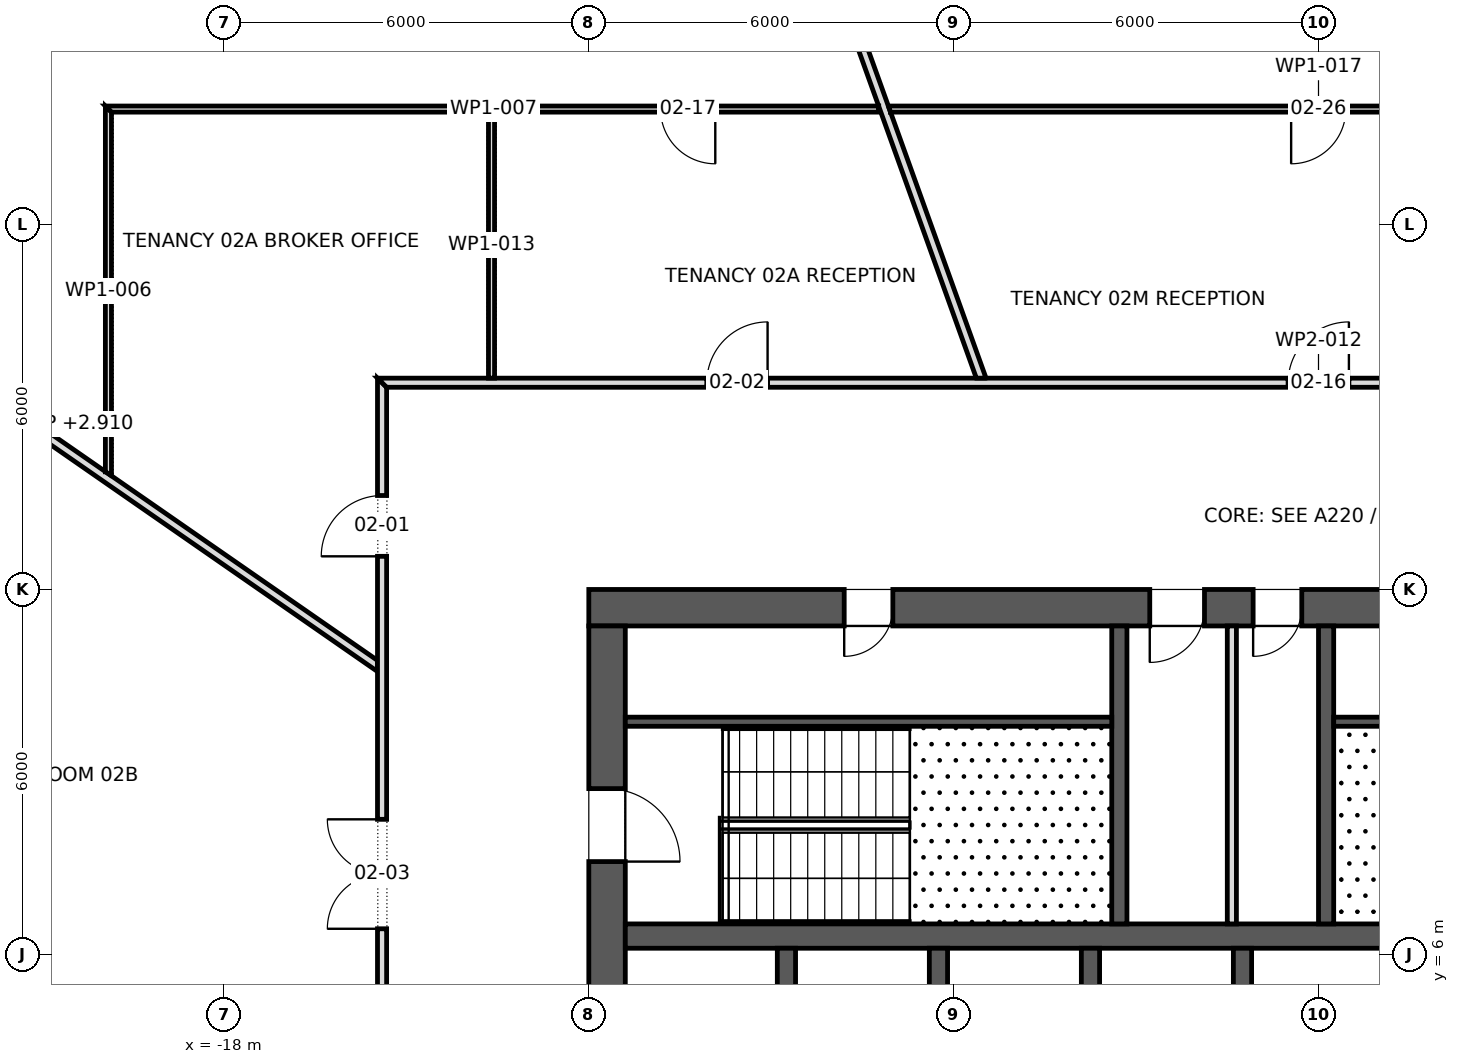
"""IFC4 building model, lengths in metres.
Left out: names, types, materials, properties, quantities, classifications, styles, units other than length and angle.
Written with IfcOpenShell. Run it as: python <this file> out.ifc"""

import sys

from ifc_helpers import new_model, si_unit, direction, frame, frame_2d, origin, place, context, subcontext, project, spatial, polyline, rectangle, outline, extrude, element, fill, save


model = new_model("IFC4")
c1 = context("Model", 3, precision=1e-05, world=origin(), true_north=direction((0.0, 1.0)))
c2 = subcontext(c1, "Body", "Model", "MODEL_VIEW")
j1 = project(units=[si_unit("LENGTHUNIT", "METRE"), si_unit("PLANEANGLEUNIT", "RADIAN")], contexts=[c1])
p1 = place(None, origin())
s1 = spatial("IfcSite", under=j1, at=p1, CompositionType="ELEMENT")
p2 = place(p1, origin())
s2 = spatial("IfcBuilding", under=s1, at=p2, CompositionType="ELEMENT")
p3 = place(p2, frame((0.0, 0.0, 44.5)))
s3 = spatial("IfcBuildingStorey", under=s2, at=p3, CompositionType="ELEMENT", Elevation=44.5)
p4 = place(p3, frame((-12.0, 11.7, 0.0), z_axis=(0.0, 0.0, 1.0), x_axis=(1.0, 0.0, 0.0)))
e1 = element("IfcWall", 1, at=p4, inside=s3, PredefinedType="SHEAR", context=c2, shape_type="SweptSolid", body=[
    extrude(rectangle(XDim=24.0, YDim=0.6, at=frame_2d((12.0, 0.0))), origin(), (0.0, 0.0, 1.0), 4.2),
])
p5 = place(p4, frame((9.225, 0.0, 0.0)))
e2 = element("IfcOpeningElement", 2, at=p5, cuts=e1, PredefinedType="OPENING", context=c2, shape_type="SweptSolid", body=[
    extrude(rectangle(XDim=0.9, YDim=2.1, at=frame_2d((0.45, 1.05))), frame((0.0, 0.312, 0.0), z_axis=(0.0, -1.0, 0.0), x_axis=(1.0, 0.0, 0.0)), (0.0, 0.0, 1.0), 0.624),
])
p6 = place(p4, frame((10.925, 0.0, 0.0)))
e3 = element("IfcOpeningElement", 3, at=p6, cuts=e1, PredefinedType="OPENING", context=c2, shape_type="SweptSolid", body=[
    extrude(rectangle(XDim=0.8, YDim=2.1, at=frame_2d((0.4, 1.05))), frame((0.0, 0.312, 0.0), z_axis=(0.0, -1.0, 0.0), x_axis=(1.0, 0.0, 0.0)), (0.0, 0.0, 1.0), 0.624),
])
p7 = place(p4, frame((4.2, 0.0, 0.0)))
e4 = element("IfcOpeningElement", 4, at=p7, cuts=e1, PredefinedType="OPENING", context=c2, shape_type="SweptSolid", body=[
    extrude(rectangle(XDim=0.8, YDim=2.1, at=frame_2d((0.4, 1.05))), frame((0.0, 0.312, 0.0), z_axis=(0.0, -1.0, 0.0), x_axis=(1.0, 0.0, 0.0)), (0.0, 0.0, 1.0), 0.624),
])
p8 = place(p4, frame((13.8, 0.0, 0.0)))
e5 = element("IfcOpeningElement", 5, at=p8, cuts=e1, PredefinedType="OPENING", context=c2, shape_type="SweptSolid", body=[
    extrude(rectangle(XDim=0.8, YDim=2.1, at=frame_2d((0.4, 1.05))), frame((0.0, 0.312, 0.0), z_axis=(0.0, -1.0, 0.0), x_axis=(1.0, 0.0, 0.0)), (0.0, 0.0, 1.0), 0.624),
])
p9 = place(p4, frame((16.6, 0.0, 0.0)))
e6 = element("IfcOpeningElement", 6, at=p9, cuts=e1, PredefinedType="OPENING", context=c2, shape_type="SweptSolid", body=[
    extrude(rectangle(XDim=0.8, YDim=2.1, at=frame_2d((0.4, 1.05))), frame((0.0, 0.312, 0.0), z_axis=(0.0, -1.0, 0.0), x_axis=(1.0, 0.0, 0.0)), (0.0, 0.0, 1.0), 0.624),
])
p10 = place(p3, frame((-11.7, -11.4, 0.0), z_axis=(0.0, 0.0, 1.0), x_axis=(0.0, 1.0, 0.0)))
e7 = element("IfcWall", 7, at=p10, inside=s3, PredefinedType="SHEAR", context=c2, shape_type="SweptSolid", body=[
    extrude(rectangle(XDim=22.8, YDim=0.6, at=frame_2d((11.4, 0.0))), origin(), (0.0, 0.0, 1.0), 4.2),
])
p11 = place(p10, frame((10.2, 0.0, 0.0)))
e8 = element("IfcOpeningElement", 8, at=p11, cuts=e7, PredefinedType="OPENING", context=c2, shape_type="SweptSolid", body=[
    extrude(rectangle(XDim=2.4, YDim=2.1, at=frame_2d((1.2, 1.05))), frame((0.0, 0.312, 0.0), z_axis=(0.0, -1.0, 0.0), x_axis=(1.0, 0.0, 0.0)), (0.0, 0.0, 1.0), 0.624),
])
p12 = place(p10, frame((18.925, 0.0, 0.0)))
e9 = element("IfcOpeningElement", 9, at=p12, cuts=e7, PredefinedType="OPENING", context=c2, shape_type="SweptSolid", body=[
    extrude(rectangle(XDim=1.2, YDim=2.1, at=frame_2d((0.6, 1.05))), frame((0.0, 0.312, 0.0), z_axis=(0.0, -1.0, 0.0), x_axis=(1.0, 0.0, 0.0)), (0.0, 0.0, 1.0), 0.624),
])
p13 = place(p10, frame((2.675, 0.0, 0.0)))
e10 = element("IfcOpeningElement", 10, at=p13, cuts=e7, PredefinedType="OPENING", context=c2, shape_type="SweptSolid", body=[
    extrude(rectangle(XDim=1.2, YDim=2.1, at=frame_2d((0.6, 1.05))), frame((0.0, 0.312, 0.0), z_axis=(0.0, -1.0, 0.0), x_axis=(1.0, 0.0, 0.0)), (0.0, 0.0, 1.0), 0.624),
])
p14 = place(p3, frame((-11.4, 6.3, 0.0), z_axis=(0.0, 0.0, 1.0), x_axis=(1.0, 0.0, 0.0)))
e11 = element("IfcWall", 11, at=p14, inside=s3, PredefinedType="SHEAR", context=c2, shape_type="SweptSolid", body=[
    extrude(rectangle(XDim=22.8, YDim=0.4, at=frame_2d((11.4, 0.0))), origin(), (0.0, 0.0, 1.0), 4.2),
])
p15 = place(p14, frame((20.85, 0.0, 0.0)))
e12 = element("IfcOpeningElement", 12, at=p15, cuts=e11, PredefinedType="OPENING", context=c2, shape_type="SweptSolid", body=[
    extrude(rectangle(XDim=1.1, YDim=2.1, at=frame_2d((0.55, 1.05))), frame((0.0, 0.212, 0.0), z_axis=(0.0, -1.0, 0.0), x_axis=(1.0, 0.0, 0.0)), (0.0, 0.0, 1.0), 0.424),
])
for number, where, z_axis, x_axis in (
    (13, (-8.75, 3.2, 0.0), (0.0, 0.0, 1.0), (0.0, 1.0, 0.0)),
    (14, (-6.25, 3.2, 0.0), (0.0, 0.0, 1.0), (0.0, 1.0, 0.0)),
    (15, (-3.75, 3.2, 0.0), (0.0, 0.0, 1.0), (0.0, 1.0, 0.0)),
    (16, (-1.25, 3.2, 0.0), (0.0, 0.0, 1.0), (0.0, 1.0, 0.0)),
):
    element("IfcWall", number, at=place(p3, frame(where, z_axis=z_axis, x_axis=x_axis)), inside=s3, PredefinedType="SHEAR", context=c2, shape_type="SweptSolid", body=[
        extrude(rectangle(XDim=2.9, YDim=0.3, at=frame_2d((1.45, 0.0))), origin(), (0.0, 0.0, 1.0), 4.2),
    ])
for number, where, z_axis, x_axis in (
    (17, (-3.275, 6.5, 0.0), (0.0, 0.0, 1.0), (0.0, 1.0, 0.0)),
    (18, (0.125, 6.5, 0.0), (0.0, 0.0, 1.0), (0.0, 1.0, 0.0)),
):
    element("IfcWall", number, at=place(p3, frame(where, z_axis=z_axis, x_axis=x_axis)), inside=s3, PredefinedType="SHEAR", context=c2, shape_type="SweptSolid", body=[
        extrude(rectangle(XDim=4.9, YDim=0.25, at=frame_2d((2.45, 0.0))), origin(), (0.0, 0.0, 1.0), 3.9),
    ])
for number, where, z_axis, x_axis in (
    (19, (-11.4, 9.825, 0.0), (0.0, 0.0, 1.0), (1.0, 0.0, 0.0)),
    (20, (0.25, 9.825, 0.0), (0.0, 0.0, 1.0), (1.0, 0.0, 0.0)),
):
    element("IfcWall", number, at=place(p3, frame(where, z_axis=z_axis, x_axis=x_axis)), inside=s3, PredefinedType="SHEAR", context=c2, shape_type="SweptSolid", body=[
        extrude(rectangle(XDim=8.0, YDim=0.15, at=frame_2d((4.0, 0.0))), origin(), (0.0, 0.0, 1.0), 3.9),
    ])
p16 = place(p3, frame((-1.425, 6.5, 0.0), z_axis=(0.0, 0.0, 1.0), x_axis=(0.0, 1.0, 0.0)))
e21 = element("IfcWall", 21, at=p16, inside=s3, PredefinedType="PARTITIONING", context=c2, shape_type="SweptSolid", body=[
    extrude(rectangle(XDim=4.9, YDim=0.15, at=frame_2d((2.45, 0.0))), origin(), (0.0, 0.0, 1.0), 3.9),
])
p17 = place(p3, frame((-26.949, 18.703, 0.0), z_axis=(0.0, 0.0, 1.0), x_axis=(0.821614916445, -0.570042918626, 0.0)))
e22 = element("IfcWall", 22, at=p17, inside=s3, PredefinedType="PARTITIONING", context=c2, shape_type="SweptSolid", body=[
    extrude(outline(polyline([(14.017, -0.075), (14.017, -0.074), (13.967, -0.002), (13.967, -0.002), (13.914, 0.075), (12.1, 0.075), (10.286, 0.075), (8.472, 0.075), (8.469, 0.073), (8.467, 0.075), (6.779, 0.075), (5.09, 0.075), (3.402, 0.075), (1.713, 0.075), (0.024, 0.075), (0.004, 0.0), (0.0, -0.071), (0.0, -0.075), (1.752, -0.075), (3.504, -0.075), (5.257, -0.075), (7.009, -0.075), (8.761, -0.075), (10.513, -0.075), (12.265, -0.075), (14.017, -0.075)])), origin(), (0.0, 0.0, 1.0), 2.91),
])
p18 = place(p3, frame((-19.9, 13.869, 0.0), z_axis=(0.0, 0.0, 1.0), x_axis=(0.0, 1.0, 0.0)))
e23 = element("IfcWall", 23, at=p18, inside=s3, PredefinedType="PARTITIONING", context=c2, shape_type="SweptSolid", body=[
    extrude(outline(polyline([(0.0, -0.05), (1.994, -0.05), (3.987, -0.05), (5.981, -0.05), (5.981, -0.05), (6.081, 0.05), (4.578, 0.05), (3.075, 0.05), (1.572, 0.05), (0.069, 0.05), (0.0, -0.05), (0.0, -0.05)])), origin(), (0.0, 0.0, 1.0), 3.9),
])
p19 = place(p3, frame((-19.95, 19.9, 0.0), z_axis=(0.0, 0.0, 1.0), x_axis=(1.0, 0.0, 0.0)))
e24 = element("IfcWall", 24, at=p19, inside=s3, PredefinedType="PARTITIONING", context=c2, shape_type="SweptSolid", body=[
    extrude(outline(polyline([(12.718, 0.05), (10.901, 0.05), (9.084, 0.05), (7.267, 0.05), (5.45, 0.05), (3.634, 0.05), (1.817, 0.05), (0.0, 0.05), (0.1, -0.05), (1.903, -0.05), (3.705, -0.05), (5.508, -0.05), (7.31, -0.05), (9.113, -0.05), (10.915, -0.05), (12.718, -0.05), (12.718, 0.05)])), origin(), (0.0, 0.0, 1.0), 3.9),
])
p20 = place(p19, frame((9.13, 0.0, 0.0)))
e25 = element("IfcOpeningElement", 25, at=p20, cuts=e24, PredefinedType="OPENING", context=c2, shape_type="SweptSolid", body=[
    extrude(rectangle(XDim=0.9, YDim=2.1, at=frame_2d((0.45, 1.05))), frame((0.0, 0.062, 0.0), z_axis=(0.0, -1.0, 0.0), x_axis=(1.0, 0.0, 0.0)), (0.0, 0.0, 1.0), 0.124),
])
p21 = place(p3, frame((-15.4, -15.475, 0.0), z_axis=(0.0, 0.0, 1.0), x_axis=(0.0, 1.0, 0.0)))
e26 = element("IfcWall", 26, at=p21, inside=s3, PredefinedType="PARTITIONING", context=c2, shape_type="SweptSolid", body=[
    extrude(outline(polyline([(0.15, -0.075), (2.066, -0.075), (3.981, -0.075), (5.897, -0.075), (7.812, -0.075), (9.728, -0.075), (11.644, -0.075), (13.56, -0.075), (15.475, -0.075), (17.391, -0.075), (19.306, -0.075), (21.222, -0.075), (23.138, -0.075), (25.053, -0.075), (26.969, -0.075), (28.885, -0.075), (30.8, -0.075), (30.95, 0.075), (29.016, 0.075), (27.081, 0.075), (25.147, 0.075), (23.212, 0.075), (21.278, 0.075), (19.344, 0.075), (17.409, 0.075), (15.475, 0.075), (13.541, 0.075), (11.606, 0.075), (9.672, 0.075), (7.738, 0.075), (5.803, 0.075), (3.869, 0.075), (1.935, 0.075), (0.0, 0.075), (0.15, -0.075)])), origin(), (0.0, 0.0, 1.0), 3.9),
])
p22 = place(p21, frame((28.02, 0.0, 0.0)))
e27 = element("IfcOpeningElement", 27, at=p22, cuts=e26, PredefinedType="OPENING", context=c2, shape_type="SweptSolid", body=[
    extrude(rectangle(XDim=1.0, YDim=2.1, at=frame_2d((0.5, 1.05))), frame((0.0, 0.087, 0.0), z_axis=(0.0, -1.0, 0.0), x_axis=(1.0, 0.0, 0.0)), (0.0, 0.0, 1.0), 0.174),
])
p23 = place(p21, frame((21.895, 0.0, 0.0)))
e28 = element("IfcOpeningElement", 28, at=p23, cuts=e26, PredefinedType="OPENING", context=c2, shape_type="SweptSolid", body=[
    extrude(rectangle(XDim=1.8, YDim=2.1, at=frame_2d((0.9, 1.05))), frame((0.0, 0.087, 0.0), z_axis=(0.0, -1.0, 0.0), x_axis=(1.0, 0.0, 0.0)), (0.0, 0.0, 1.0), 0.174),
])
p24 = place(p21, frame((15.798, 0.0, 0.0)))
e29 = element("IfcOpeningElement", 29, at=p24, cuts=e26, PredefinedType="OPENING", context=c2, shape_type="SweptSolid", body=[
    extrude(rectangle(XDim=1.8, YDim=2.1, at=frame_2d((0.9, 1.05))), frame((0.0, 0.087, 0.0), z_axis=(0.0, -1.0, 0.0), x_axis=(1.0, 0.0, 0.0)), (0.0, 0.0, 1.0), 0.174),
])
p25 = place(p21, frame((10.343, 0.0, 0.0)))
e30 = element("IfcOpeningElement", 30, at=p25, cuts=e26, PredefinedType="OPENING", context=c2, shape_type="SweptSolid", body=[
    extrude(rectangle(XDim=1.8, YDim=2.1, at=frame_2d((0.9, 1.05))), frame((0.0, 0.087, 0.0), z_axis=(0.0, -1.0, 0.0), x_axis=(1.0, 0.0, 0.0)), (0.0, 0.0, 1.0), 0.174),
])
p26 = place(p21, frame((3.795, 0.0, 0.0)))
e31 = element("IfcOpeningElement", 31, at=p26, cuts=e26, PredefinedType="OPENING", context=c2, shape_type="SweptSolid", body=[
    extrude(rectangle(XDim=1.0, YDim=2.1, at=frame_2d((0.5, 1.05))), frame((0.0, 0.087, 0.0), z_axis=(0.0, -1.0, 0.0), x_axis=(1.0, 0.0, 0.0)), (0.0, 0.0, 1.0), 0.174),
])
p27 = place(p3, frame((-15.457, 3.965, 0.0), z_axis=(0.0, 0.0, 1.0), x_axis=(-0.968658160146, 0.248397602209, 0.0)))
e32 = element("IfcWall", 32, at=p27, inside=s3, PredefinedType="PARTITIONING", context=c2, shape_type="SweptSolid", body=[
    extrude(outline(polyline([(0.038, -0.075), (1.881, -0.075), (3.723, -0.075), (5.566, -0.075), (7.409, -0.075), (9.251, -0.075), (11.094, -0.075), (12.937, -0.075), (14.779, -0.075), (16.622, -0.075), (18.465, -0.075), (18.478, -0.012), (18.478, 0.075), (16.63, 0.075), (14.782, 0.075), (12.935, 0.075), (11.087, 0.075), (9.239, 0.075), (7.391, 0.075), (5.543, 0.075), (3.696, 0.075), (1.848, 0.075), (0.0, 0.075), (0.0, 0.073), (0.038, -0.075)])), origin(), (0.0, 0.0, 1.0), 2.9),
])
p28 = place(p3, frame((-15.475, 15.4, 0.0), z_axis=(0.0, 0.0, 1.0), x_axis=(1.0, 0.0, 0.0)))
e33 = element("IfcWall", 33, at=p28, inside=s3, PredefinedType="PARTITIONING", context=c2, shape_type="SweptSolid", body=[
    extrude(outline(polyline([(0.15, -0.075), (2.066, -0.075), (3.981, -0.075), (5.897, -0.075), (7.812, -0.075), (9.728, -0.075), (11.644, -0.075), (13.56, -0.075), (15.475, -0.075), (17.391, -0.075), (19.306, -0.075), (21.222, -0.075), (23.138, -0.075), (25.053, -0.075), (26.969, -0.075), (28.885, -0.075), (30.8, -0.075), (30.95, 0.075), (29.016, 0.075), (27.081, 0.075), (25.147, 0.075), (23.212, 0.075), (21.278, 0.075), (19.344, 0.075), (17.409, 0.075), (15.475, 0.075), (13.541, 0.075), (11.606, 0.075), (9.672, 0.075), (7.738, 0.075), (5.803, 0.075), (3.869, 0.075), (1.935, 0.075), (0.0, 0.075), (0.15, -0.075)])), origin(), (0.0, 0.0, 1.0), 3.9),
])
p29 = place(p28, frame((5.415, 0.0, 0.0)))
e34 = element("IfcOpeningElement", 34, at=p29, cuts=e33, PredefinedType="OPENING", context=c2, shape_type="SweptSolid", body=[
    extrude(rectangle(XDim=1.0, YDim=2.1, at=frame_2d((0.5, 1.05))), frame((0.0, 0.087, 0.0), z_axis=(0.0, -1.0, 0.0), x_axis=(1.0, 0.0, 0.0)), (0.0, 0.0, 1.0), 0.174),
])
p30 = place(p28, frame((25.435, 0.0, 0.0)))
e35 = element("IfcOpeningElement", 35, at=p30, cuts=e33, PredefinedType="OPENING", context=c2, shape_type="SweptSolid", body=[
    extrude(rectangle(XDim=1.0, YDim=2.1, at=frame_2d((0.5, 1.05))), frame((0.0, 0.087, 0.0), z_axis=(0.0, -1.0, 0.0), x_axis=(1.0, 0.0, 0.0)), (0.0, 0.0, 1.0), 0.174),
])
p31 = place(p28, frame((14.975, 0.0, 0.0)))
e36 = element("IfcOpeningElement", 36, at=p31, cuts=e33, PredefinedType="OPENING", context=c2, shape_type="SweptSolid", body=[
    extrude(rectangle(XDim=1.0, YDim=2.1, at=frame_2d((0.5, 1.05))), frame((0.0, 0.087, 0.0), z_axis=(0.0, -1.0, 0.0), x_axis=(1.0, 0.0, 0.0)), (0.0, 0.0, 1.0), 0.174),
])
p32 = place(p3, frame((-13.6, 19.85, 0.0), z_axis=(0.0, 0.0, 1.0), x_axis=(0.0, -1.0, 0.0)))
e37 = element("IfcWall", 37, at=p32, inside=s3, PredefinedType="PARTITIONING", context=c2, shape_type="SweptSolid", body=[
    extrude(rectangle(XDim=4.375, YDim=0.1, at=frame_2d((2.188, 0.0))), origin(), (0.0, 0.0, 1.0), 3.9),
])
p33 = place(p3, frame((-10.119, 28.209, 0.0), z_axis=(0.0, 0.0, 1.0), x_axis=(0.337949016046, -0.941164418448, 0.0)))
e38 = element("IfcWall", 38, at=p33, inside=s3, PredefinedType="PARTITIONING", context=c2, shape_type="SweptSolid", body=[
    extrude(outline(polyline([(0.0, -0.075), (1.75, -0.075), (3.5, -0.075), (5.249, -0.075), (6.999, -0.075), (8.749, -0.075), (8.749, -0.074), (8.751, -0.075), (10.335, -0.075), (11.919, -0.075), (13.503, -0.075), (13.555, 0.069), (13.555, 0.069), (13.557, 0.074), (13.557, 0.075), (12.008, 0.075), (10.458, 0.075), (8.909, 0.075), (8.908, 0.073), (8.903, 0.075), (7.125, 0.075), (5.347, 0.075), (3.57, 0.075), (1.792, 0.075), (0.014, 0.075), (0.0, 0.0), (0.0, -0.071), (0.0, -0.075)])), origin(), (0.0, 0.0, 1.0), 2.91),
])
p34 = place(p3, frame((-7.074, 19.9, 0.0), z_axis=(0.0, 0.0, 1.0), x_axis=(1.0, 0.0, 0.0)))
e39 = element("IfcWall", 39, at=p34, inside=s3, PredefinedType="PARTITIONING", context=c2, shape_type="SweptSolid", body=[
    extrude(outline(polyline([(0.036, -0.05), (1.795, -0.05), (3.555, -0.05), (5.314, -0.05), (7.074, -0.05), (8.833, -0.05), (10.593, -0.05), (12.353, -0.05), (14.112, -0.05), (14.148, 0.05), (14.148, 0.05), (12.379, 0.05), (10.611, 0.05), (8.843, 0.05), (7.074, 0.05), (5.305, 0.05), (3.537, 0.05), (1.769, 0.05), (0.0, 0.05), (0.0, 0.05), (0.036, -0.05)])), origin(), (0.0, 0.0, 1.0), 3.9),
])
p35 = place(p34, frame((6.624, 0.0, 0.0)))
e40 = element("IfcOpeningElement", 40, at=p35, cuts=e39, PredefinedType="OPENING", context=c2, shape_type="SweptSolid", body=[
    extrude(rectangle(XDim=0.9, YDim=2.1, at=frame_2d((0.45, 1.05))), frame((0.0, 0.062, 0.0), z_axis=(0.0, -1.0, 0.0), x_axis=(1.0, 0.0, 0.0)), (0.0, 0.0, 1.0), 0.124),
])
p36 = place(p12, frame((1.2, 0.0, 0.0), z_axis=(0.0, 0.0, 1.0), x_axis=(-1.0, 0.0, 0.0)))
e41 = element("IfcDoor", 41, at=p36, inside=s3, OperationType="SINGLE_SWING_LEFT", PredefinedType="DOOR", context=c2, shape_type="SweptSolid", body=[
    extrude(rectangle(XDim=1.2, YDim=2.1, at=frame_2d((0.6, 1.05))), frame((0.0, 0.025, 0.0), z_axis=(0.0, -1.0, 0.0), x_axis=(1.0, 0.0, 0.0)), (0.0, 0.0, 1.0), 0.05),
])
fill(e9, e41)
p37 = place(p5, frame((0.9, 0.0, 0.0), z_axis=(0.0, 0.0, 1.0), x_axis=(-1.0, 0.0, 0.0)))
e42 = element("IfcDoor", 42, at=p37, inside=s3, OperationType="SINGLE_SWING_LEFT", PredefinedType="DOOR", context=c2, shape_type="SweptSolid", body=[
    extrude(rectangle(XDim=0.9, YDim=2.1, at=frame_2d((0.45, 1.05))), frame((0.0, 0.025, 0.0), z_axis=(0.0, -1.0, 0.0), x_axis=(1.0, 0.0, 0.0)), (0.0, 0.0, 1.0), 0.05),
])
fill(e2, e42)
p38 = place(p6, frame((0.8, 0.0, 0.0), z_axis=(0.0, 0.0, 1.0), x_axis=(-1.0, 0.0, 0.0)))
e43 = element("IfcDoor", 43, at=p38, inside=s3, OperationType="SINGLE_SWING_LEFT", PredefinedType="DOOR", context=c2, shape_type="SweptSolid", body=[
    extrude(rectangle(XDim=0.8, YDim=2.1, at=frame_2d((0.4, 1.05))), frame((0.0, 0.025, 0.0), z_axis=(0.0, -1.0, 0.0), x_axis=(1.0, 0.0, 0.0)), (0.0, 0.0, 1.0), 0.05),
])
fill(e3, e43)
p39 = place(p7, frame((0.8, 0.0, 0.0), z_axis=(0.0, 0.0, 1.0), x_axis=(-1.0, 0.0, 0.0)))
e44 = element("IfcDoor", 44, at=p39, inside=s3, OperationType="SINGLE_SWING_LEFT", PredefinedType="DOOR", context=c2, shape_type="SweptSolid", body=[
    extrude(rectangle(XDim=0.8, YDim=2.1, at=frame_2d((0.4, 1.05))), frame((0.0, 0.025, 0.0), z_axis=(0.0, -1.0, 0.0), x_axis=(1.0, 0.0, 0.0)), (0.0, 0.0, 1.0), 0.05),
])
fill(e4, e44)
p40 = place(p22, origin())
e45 = element("IfcDoor", 45, at=p40, inside=s3, OperationType="SINGLE_SWING_RIGHT", PredefinedType="DOOR", context=c2, shape_type="SweptSolid", body=[
    extrude(rectangle(XDim=1.0, YDim=2.1, at=frame_2d((0.5, 1.05))), frame((0.0, 0.025, 0.0), z_axis=(0.0, -1.0, 0.0), x_axis=(1.0, 0.0, 0.0)), (0.0, 0.0, 1.0), 0.05),
])
fill(e27, e45)
p41 = place(p29, origin())
e46 = element("IfcDoor", 46, at=p41, inside=s3, OperationType="SINGLE_SWING_LEFT", PredefinedType="DOOR", context=c2, shape_type="SweptSolid", body=[
    extrude(rectangle(XDim=1.0, YDim=2.1, at=frame_2d((0.5, 1.05))), frame((0.0, 0.025, 0.0), z_axis=(0.0, -1.0, 0.0), x_axis=(1.0, 0.0, 0.0)), (0.0, 0.0, 1.0), 0.05),
])
fill(e34, e46)
p42 = place(p23, origin())
e47 = element("IfcDoor", 47, at=p42, inside=s3, OperationType="DOUBLE_DOOR_SINGLE_SWING", PredefinedType="DOOR", context=c2, shape_type="SweptSolid", body=[
    extrude(rectangle(XDim=1.8, YDim=2.1, at=frame_2d((0.9, 1.05))), frame((0.0, 0.025, 0.0), z_axis=(0.0, -1.0, 0.0), x_axis=(1.0, 0.0, 0.0)), (0.0, 0.0, 1.0), 0.05),
])
fill(e28, e47)
p43 = place(p31, origin())
e48 = element("IfcDoor", 48, at=p43, inside=s3, OperationType="SINGLE_SWING_LEFT", PredefinedType="DOOR", context=c2, shape_type="SweptSolid", body=[
    extrude(rectangle(XDim=1.0, YDim=2.1, at=frame_2d((0.5, 1.05))), frame((0.0, 0.025, 0.0), z_axis=(0.0, -1.0, 0.0), x_axis=(1.0, 0.0, 0.0)), (0.0, 0.0, 1.0), 0.05),
])
fill(e36, e48)
p44 = place(p20, frame((0.9, 0.0, 0.0), z_axis=(0.0, 0.0, 1.0), x_axis=(-1.0, 0.0, 0.0)))
e49 = element("IfcDoor", 49, at=p44, inside=s3, OperationType="SINGLE_SWING_RIGHT", PredefinedType="DOOR", context=c2, shape_type="SweptSolid", body=[
    extrude(rectangle(XDim=0.9, YDim=2.1, at=frame_2d((0.45, 1.05))), frame((0.0, 0.025, 0.0), z_axis=(0.0, -1.0, 0.0), x_axis=(1.0, 0.0, 0.0)), (0.0, 0.0, 1.0), 0.05),
])
fill(e25, e49)
p45 = place(p35, frame((0.9, 0.0, 0.0), z_axis=(0.0, 0.0, 1.0), x_axis=(-1.0, 0.0, 0.0)))
e50 = element("IfcDoor", 50, at=p45, inside=s3, OperationType="SINGLE_SWING_LEFT", PredefinedType="DOOR", context=c2, shape_type="SweptSolid", body=[
    extrude(rectangle(XDim=0.9, YDim=2.1, at=frame_2d((0.45, 1.05))), frame((0.0, 0.025, 0.0), z_axis=(0.0, -1.0, 0.0), x_axis=(1.0, 0.0, 0.0)), (0.0, 0.0, 1.0), 0.05),
])
fill(e40, e50)
save(model, sys.argv[1])
